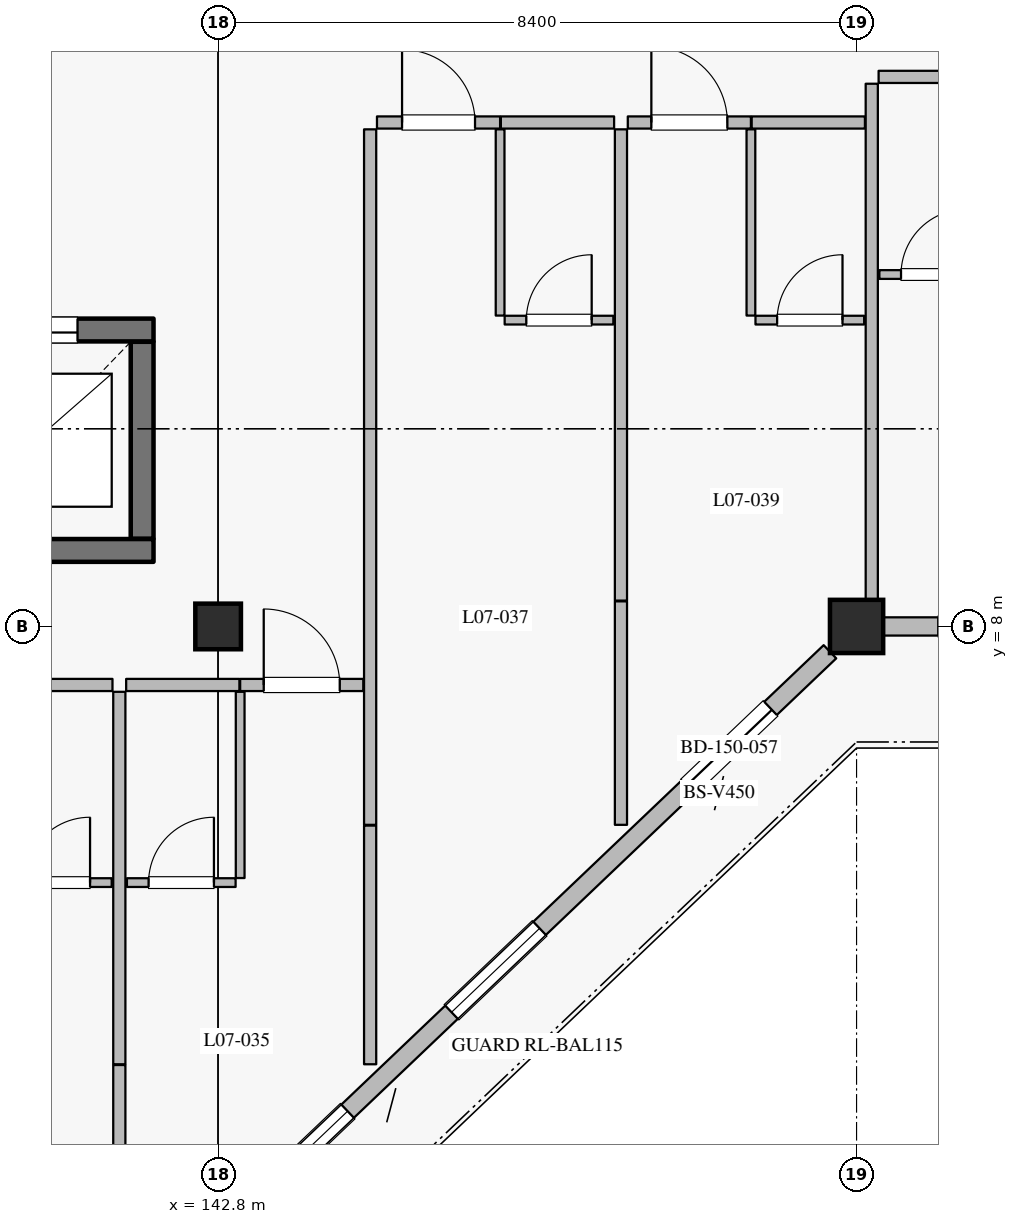
"""IFC4 building model, lengths in metres.
Left out: names, types, materials, properties, quantities, classifications, styles, units other than length and angle.
Written with IfcOpenShell. Run it as: python <this file> out.ifc"""

import sys

from ifc_helpers import new_model, si_unit, direction, frame, frame_2d, origin, origin_2d, place, context, subcontext, project, spatial, rectangle, extrude, element, fill, save


model = new_model("IFC4")
c1 = context("Model", 3, precision=1e-05, world=origin(), true_north=direction((0.0, 1.0)))
c2 = subcontext(c1, "Body", "Model", "MODEL_VIEW")
j1 = project(units=[si_unit("LENGTHUNIT", "METRE"), si_unit("PLANEANGLEUNIT", "RADIAN")], contexts=[c1])
p1 = place(None, origin())
s1 = spatial("IfcSite", under=j1, at=p1, CompositionType="ELEMENT")
p2 = place(p1, origin())
s2 = spatial("IfcBuilding", under=s1, at=p2, CompositionType="ELEMENT")
p3 = place(p2, frame((0.0, 0.0, 32.4)))
s3 = spatial("IfcBuildingStorey", under=s2, at=p3, CompositionType="ELEMENT", Elevation=32.4)
p4 = place(p3, frame((151.2, 8.0, 0.0), z_axis=(0.0, 0.0, 1.0), x_axis=(1.0, 0.0, 0.0)))
e1 = element("IfcColumn", 1, at=p4, inside=s3, PredefinedType="COLUMN", context=c2, shape_type="SweptSolid", body=[
    extrude(rectangle(XDim=0.7, YDim=0.7, at=origin_2d()), origin(), (0.0, 0.0, 1.0), 3.6),
])
p5 = place(p3, frame((142.8, 8.0, 0.0), z_axis=(0.0, 0.0, 1.0), x_axis=(1.0, 0.0, 0.0)))
e2 = element("IfcColumn", 2, at=p5, inside=s3, PredefinedType="COLUMN", context=c2, shape_type="SweptSolid", body=[
    extrude(rectangle(XDim=0.6, YDim=0.6, at=origin_2d()), origin(), (0.0, 0.0, 1.0), 3.6),
])
p6 = place(p3, frame((150.85, 7.667, 0.0), z_axis=(0.0, 0.0, 1.0), x_axis=(-0.724116091282, -0.689678103427, 0.0)))
e3 = element("IfcWall", 3, at=p6, inside=s3, PredefinedType="SOLIDWALL", context=c2, shape_type="SweptSolid", body=[
    extrude(rectangle(XDim=10.634, YDim=0.24, at=frame_2d((5.317, 0.0))), origin(), (0.0, 0.0, 1.0), 2.94),
])
p7 = place(p6, frame((1.08, 0.0, 0.0)))
e4 = element("IfcOpeningElement", 4, at=p7, cuts=e3, PredefinedType="OPENING", context=c2, shape_type="SweptSolid", body=[
    extrude(rectangle(XDim=1.5, YDim=2.25, at=frame_2d((0.75, 1.125))), frame((0.0, 0.13, 0.0), z_axis=(0.0, -1.0, 0.0), x_axis=(1.0, 0.0, 0.0)), (0.0, 0.0, 1.0), 0.26),
])
p8 = place(p6, frame((5.276, 0.0, 0.8)))
e5 = element("IfcOpeningElement", 5, at=p8, cuts=e3, PredefinedType="OPENING", context=c2, shape_type="SweptSolid", body=[
    extrude(rectangle(XDim=1.6, YDim=1.6, at=frame_2d((0.8, 0.8))), frame((0.0, 0.13, 0.0), z_axis=(0.0, -1.0, 0.0), x_axis=(1.0, 0.0, 0.0)), (0.0, 0.0, 1.0), 0.26),
])
p9 = place(p6, frame((8.764, 0.0, 0.8)))
e6 = element("IfcOpeningElement", 6, at=p9, cuts=e3, PredefinedType="OPENING", context=c2, shape_type="SweptSolid", body=[
    extrude(rectangle(XDim=1.6, YDim=1.6, at=frame_2d((0.8, 0.8))), frame((0.0, 0.13, 0.0), z_axis=(0.0, -1.0, 0.0), x_axis=(1.0, 0.0, 0.0)), (0.0, 0.0, 1.0), 0.26),
])
p10 = place(p3, frame((159.25, 8.0, 0.0), z_axis=(0.0, 0.0, 1.0), x_axis=(-1.0, 0.0, 0.0)))
e7 = element("IfcWall", 7, at=p10, inside=s3, PredefinedType="SOLIDWALL", context=c2, shape_type="SweptSolid", body=[
    extrude(rectangle(XDim=7.7, YDim=0.24, at=frame_2d((3.85, 0.0))), origin(), (0.0, 0.0, 1.0), 2.94),
])
p11 = place(p10, frame((2.15, 0.0, 0.0)))
e8 = element("IfcOpeningElement", 8, at=p11, cuts=e7, PredefinedType="OPENING", context=c2, shape_type="SweptSolid", body=[
    extrude(rectangle(XDim=1.5, YDim=2.25, at=frame_2d((0.75, 1.125))), frame((0.0, 0.13, 0.0), z_axis=(0.0, -1.0, 0.0), x_axis=(1.0, 0.0, 0.0)), (0.0, 0.0, 1.0), 0.26),
])
p12 = place(p10, frame((5.375, 0.0, 0.8)))
e9 = element("IfcOpeningElement", 9, at=p12, cuts=e7, PredefinedType="OPENING", context=c2, shape_type="SweptSolid", body=[
    extrude(rectangle(XDim=1.6, YDim=1.6, at=frame_2d((0.8, 0.8))), frame((0.0, 0.13, 0.0), z_axis=(0.0, -1.0, 0.0), x_axis=(1.0, 0.0, 0.0)), (0.0, 0.0, 1.0), 0.26),
])
p13 = place(p3, frame((138.85, 9.0, 0.0), z_axis=(0.0, 0.0, 1.0), x_axis=(1.0, 0.0, 0.0)))
e10 = element("IfcWall", 10, at=p13, inside=s3, PredefinedType="SHEAR", context=c2, shape_type="SweptSolid", body=[
    extrude(rectangle(XDim=3.1, YDim=0.3, at=frame_2d((1.55, 0.0))), origin(), (0.0, 0.0, 1.0), 3.335),
])
p14 = place(p3, frame((141.8, 9.155, 0.0), z_axis=(0.0, 0.0, 1.0), x_axis=(0.0, 1.0, 0.0)))
e11 = element("IfcWall", 11, at=p14, inside=s3, PredefinedType="SHEAR", context=c2, shape_type="SweptSolid", body=[
    extrude(rectangle(XDim=2.59, YDim=0.3, at=frame_2d((1.295, 0.0))), origin(), (0.0, 0.0, 1.0), 3.335),
])
p15 = place(p3, frame((141.95, 11.9, 0.0), z_axis=(0.0, 0.0, 1.0), x_axis=(-1.0, 0.0, 0.0)))
e12 = element("IfcWall", 12, at=p15, inside=s3, PredefinedType="SHEAR", context=c2, shape_type="SweptSolid", body=[
    extrude(rectangle(XDim=3.1, YDim=0.3, at=frame_2d((1.55, 0.0))), origin(), (0.0, 0.0, 1.0), 3.335),
])
p16 = place(p15, frame((1.0, 0.0, 0.0)))
e13 = element("IfcOpeningElement", 13, at=p16, cuts=e12, PredefinedType="OPENING", context=c2, shape_type="SweptSolid", body=[
    extrude(rectangle(XDim=1.1, YDim=2.2, at=frame_2d((0.55, 1.1))), frame((0.0, 0.16, 0.0), z_axis=(0.0, -1.0, 0.0), x_axis=(1.0, 0.0, 0.0)), (0.0, 0.0, 1.0), 0.32),
])
p17 = place(p3, frame((139.92, 7.23, 0.0), z_axis=(0.0, 0.0, 1.0), x_axis=(1.0, 0.0, 0.0)))
e14 = element("IfcWall", 14, at=p17, inside=s3, PredefinedType="PARTITIONING", context=c2, shape_type="SweptSolid", body=[
    extrude(rectangle(XDim=1.49, YDim=0.16, at=frame_2d((0.745, 0.0))), origin(), (0.0, 0.0, 1.0), 3.335),
])
p18 = place(p3, frame((139.97, 4.63, 0.0), z_axis=(0.0, 0.0, 1.0), x_axis=(1.0, 0.0, 0.0)))
e15 = element("IfcWall", 15, at=p18, inside=s3, PredefinedType="PARTITIONING", context=c2, shape_type="SweptSolid", body=[
    extrude(rectangle(XDim=1.43, YDim=0.115, at=frame_2d((0.715, 0.0))), origin(), (0.0, 0.0, 1.0), 3.335),
])
p19 = place(p18, frame((0.285, 0.0, 0.0)))
e16 = element("IfcOpeningElement", 16, at=p19, cuts=e15, PredefinedType="OPENING", context=c2, shape_type="SweptSolid", body=[
    extrude(rectangle(XDim=0.86, YDim=2.12, at=frame_2d((0.43, 1.06))), frame((0.0, 0.067, 0.0), z_axis=(0.0, -1.0, 0.0), x_axis=(1.0, 0.0, 0.0)), (0.0, 0.0, 1.0), 0.135),
])
p20 = place(p3, frame((141.5, 0.34, 0.0), z_axis=(0.0, 0.0, 1.0), x_axis=(0.0, 1.0, 0.0)))
e17 = element("IfcWall", 17, at=p20, inside=s3, PredefinedType="PARTITIONING", context=c2, shape_type="SweptSolid", body=[
    extrude(rectangle(XDim=1.89, YDim=0.16, at=frame_2d((0.945, 0.0))), origin(), (0.0, 0.0, 1.0), 3.335),
])
p21 = place(p3, frame((141.59, 7.23, 0.0), z_axis=(0.0, 0.0, 1.0), x_axis=(1.0, 0.0, 0.0)))
e18 = element("IfcWall", 18, at=p21, inside=s3, PredefinedType="PARTITIONING", context=c2, shape_type="SweptSolid", body=[
    extrude(rectangle(XDim=1.49, YDim=0.16, at=frame_2d((0.745, 0.0))), origin(), (0.0, 0.0, 1.0), 3.335),
])
p22 = place(p3, frame((143.09, 7.23, 0.0), z_axis=(0.0, 0.0, 1.0), x_axis=(1.0, 0.0, 0.0)))
e19 = element("IfcWall", 19, at=p22, inside=s3, PredefinedType="PARTITIONING", context=c2, shape_type="SweptSolid", body=[
    extrude(rectangle(XDim=1.62, YDim=0.16, at=frame_2d((0.81, 0.0))), origin(), (0.0, 0.0, 1.0), 3.335),
])
p23 = place(p22, frame((0.31, 0.0, 0.0)))
e20 = element("IfcOpeningElement", 20, at=p23, cuts=e19, PredefinedType="OPENING", context=c2, shape_type="SweptSolid", body=[
    extrude(rectangle(XDim=1.0, YDim=2.25, at=frame_2d((0.5, 1.125))), frame((0.0, 0.09, 0.0), z_axis=(0.0, -1.0, 0.0), x_axis=(1.0, 0.0, 0.0)), (0.0, 0.0, 1.0), 0.18),
])
p24 = place(p3, frame((143.09, 4.69, 0.0), z_axis=(0.0, 0.0, 1.0), x_axis=(0.0, 1.0, 0.0)))
e21 = element("IfcWall", 21, at=p24, inside=s3, PredefinedType="PARTITIONING", context=c2, shape_type="SweptSolid", body=[
    extrude(rectangle(XDim=2.45, YDim=0.115, at=frame_2d((1.225, 0.0))), origin(), (0.0, 0.0, 1.0), 3.335),
])
p25 = place(p3, frame((141.6, 4.63, 0.0), z_axis=(0.0, 0.0, 1.0), x_axis=(1.0, 0.0, 0.0)))
e22 = element("IfcWall", 22, at=p25, inside=s3, PredefinedType="PARTITIONING", context=c2, shape_type="SweptSolid", body=[
    extrude(rectangle(XDim=1.43, YDim=0.115, at=frame_2d((0.715, 0.0))), origin(), (0.0, 0.0, 1.0), 3.335),
])
p26 = place(p25, frame((0.285, 0.0, 0.0)))
e23 = element("IfcOpeningElement", 23, at=p26, cuts=e22, PredefinedType="OPENING", context=c2, shape_type="SweptSolid", body=[
    extrude(rectangle(XDim=0.86, YDim=2.12, at=frame_2d((0.43, 1.06))), frame((0.0, 0.067, 0.0), z_axis=(0.0, -1.0, 0.0), x_axis=(1.0, 0.0, 0.0)), (0.0, 0.0, 1.0), 0.135),
])
p27 = place(p3, frame((141.5, 2.24, 0.0), z_axis=(0.0, 0.0, 1.0), x_axis=(0.0, 1.0, 0.0)))
e24 = element("IfcWall", 24, at=p27, inside=s3, PredefinedType="PARTITIONING", context=c2, shape_type="SweptSolid", body=[
    extrude(rectangle(XDim=4.9, YDim=0.16, at=frame_2d((2.45, 0.0))), origin(), (0.0, 0.0, 1.0), 3.335),
])
p28 = place(p3, frame((144.8, 2.24, 0.0), z_axis=(0.0, 0.0, 1.0), x_axis=(0.0, 1.0, 0.0)))
e25 = element("IfcWall", 25, at=p28, inside=s3, PredefinedType="PARTITIONING", context=c2, shape_type="SweptSolid", body=[
    extrude(rectangle(XDim=3.14, YDim=0.16, at=frame_2d((1.57, 0.0))), origin(), (0.0, 0.0, 1.0), 3.335),
])
p29 = place(p3, frame((144.89, 14.63, 0.0), z_axis=(0.0, 0.0, 1.0), x_axis=(1.0, 0.0, 0.0)))
e26 = element("IfcWall", 26, at=p29, inside=s3, PredefinedType="PARTITIONING", context=c2, shape_type="SweptSolid", body=[
    extrude(rectangle(XDim=1.62, YDim=0.16, at=frame_2d((0.81, 0.0))), origin(), (0.0, 0.0, 1.0), 3.335),
])
p30 = place(p29, frame((0.33, 0.0, 0.0)))
e27 = element("IfcOpeningElement", 27, at=p30, cuts=e26, PredefinedType="OPENING", context=c2, shape_type="SweptSolid", body=[
    extrude(rectangle(XDim=0.96, YDim=2.2, at=frame_2d((0.48, 1.1))), frame((0.0, 0.09, 0.0), z_axis=(0.0, -1.0, 0.0), x_axis=(1.0, 0.0, 0.0)), (0.0, 0.0, 1.0), 0.18),
])
p31 = place(p3, frame((146.52, 14.63, 0.0), z_axis=(0.0, 0.0, 1.0), x_axis=(1.0, 0.0, 0.0)))
e28 = element("IfcWall", 28, at=p31, inside=s3, PredefinedType="PARTITIONING", context=c2, shape_type="SweptSolid", body=[
    extrude(rectangle(XDim=1.49, YDim=0.16, at=frame_2d((0.745, 0.0))), origin(), (0.0, 0.0, 1.0), 3.335),
])
p32 = place(p3, frame((146.51, 12.09, 0.0), z_axis=(0.0, 0.0, 1.0), x_axis=(0.0, 1.0, 0.0)))
e29 = element("IfcWall", 29, at=p32, inside=s3, PredefinedType="PARTITIONING", context=c2, shape_type="SweptSolid", body=[
    extrude(rectangle(XDim=2.45, YDim=0.115, at=frame_2d((1.225, 0.0))), origin(), (0.0, 0.0, 1.0), 3.335),
])
p33 = place(p3, frame((146.57, 12.03, 0.0), z_axis=(0.0, 0.0, 1.0), x_axis=(1.0, 0.0, 0.0)))
e30 = element("IfcWall", 30, at=p33, inside=s3, PredefinedType="PARTITIONING", context=c2, shape_type="SweptSolid", body=[
    extrude(rectangle(XDim=1.43, YDim=0.115, at=frame_2d((0.715, 0.0))), origin(), (0.0, 0.0, 1.0), 3.335),
])
p34 = place(p33, frame((0.285, 0.0, 0.0)))
e31 = element("IfcOpeningElement", 31, at=p34, cuts=e30, PredefinedType="OPENING", context=c2, shape_type="SweptSolid", body=[
    extrude(rectangle(XDim=0.86, YDim=2.12, at=frame_2d((0.43, 1.06))), frame((0.0, 0.067, 0.0), z_axis=(0.0, -1.0, 0.0), x_axis=(1.0, 0.0, 0.0)), (0.0, 0.0, 1.0), 0.135),
])
p35 = place(p3, frame((144.8, 5.39, 0.0), z_axis=(0.0, 0.0, 1.0), x_axis=(0.0, 1.0, 0.0)))
e32 = element("IfcWall", 32, at=p35, inside=s3, PredefinedType="PARTITIONING", context=c2, shape_type="SweptSolid", body=[
    extrude(rectangle(XDim=9.15, YDim=0.16, at=frame_2d((4.575, 0.0))), origin(), (0.0, 0.0, 1.0), 3.335),
])
p36 = place(p3, frame((148.1, 5.39, 0.0), z_axis=(0.0, 0.0, 1.0), x_axis=(0.0, 1.0, 0.0)))
e33 = element("IfcWall", 33, at=p36, inside=s3, PredefinedType="PARTITIONING", context=c2, shape_type="SweptSolid", body=[
    extrude(rectangle(XDim=2.94, YDim=0.16, at=frame_2d((1.47, 0.0))), origin(), (0.0, 0.0, 1.0), 3.335),
])
p37 = place(p3, frame((148.19, 14.63, 0.0), z_axis=(0.0, 0.0, 1.0), x_axis=(1.0, 0.0, 0.0)))
e34 = element("IfcWall", 34, at=p37, inside=s3, PredefinedType="PARTITIONING", context=c2, shape_type="SweptSolid", body=[
    extrude(rectangle(XDim=1.62, YDim=0.16, at=frame_2d((0.81, 0.0))), origin(), (0.0, 0.0, 1.0), 3.335),
])
p38 = place(p37, frame((0.31, 0.0, 0.0)))
e35 = element("IfcOpeningElement", 35, at=p38, cuts=e34, PredefinedType="OPENING", context=c2, shape_type="SweptSolid", body=[
    extrude(rectangle(XDim=1.0, YDim=2.25, at=frame_2d((0.5, 1.125))), frame((0.0, 0.09, 0.0), z_axis=(0.0, -1.0, 0.0), x_axis=(1.0, 0.0, 0.0)), (0.0, 0.0, 1.0), 0.18),
])
p39 = place(p3, frame((149.82, 14.63, 0.0), z_axis=(0.0, 0.0, 1.0), x_axis=(1.0, 0.0, 0.0)))
e36 = element("IfcWall", 36, at=p39, inside=s3, PredefinedType="PARTITIONING", context=c2, shape_type="SweptSolid", body=[
    extrude(rectangle(XDim=1.49, YDim=0.16, at=frame_2d((0.745, 0.0))), origin(), (0.0, 0.0, 1.0), 3.335),
])
p40 = place(p3, frame((149.81, 12.09, 0.0), z_axis=(0.0, 0.0, 1.0), x_axis=(0.0, 1.0, 0.0)))
e37 = element("IfcWall", 37, at=p40, inside=s3, PredefinedType="PARTITIONING", context=c2, shape_type="SweptSolid", body=[
    extrude(rectangle(XDim=2.45, YDim=0.115, at=frame_2d((1.225, 0.0))), origin(), (0.0, 0.0, 1.0), 3.335),
])
p41 = place(p3, frame((149.87, 12.03, 0.0), z_axis=(0.0, 0.0, 1.0), x_axis=(1.0, 0.0, 0.0)))
e38 = element("IfcWall", 38, at=p41, inside=s3, PredefinedType="PARTITIONING", context=c2, shape_type="SweptSolid", body=[
    extrude(rectangle(XDim=1.43, YDim=0.115, at=frame_2d((0.715, 0.0))), origin(), (0.0, 0.0, 1.0), 3.335),
])
p42 = place(p41, frame((0.285, 0.0, 0.0)))
e39 = element("IfcOpeningElement", 39, at=p42, cuts=e38, PredefinedType="OPENING", context=c2, shape_type="SweptSolid", body=[
    extrude(rectangle(XDim=0.86, YDim=2.12, at=frame_2d((0.43, 1.06))), frame((0.0, 0.067, 0.0), z_axis=(0.0, -1.0, 0.0), x_axis=(1.0, 0.0, 0.0)), (0.0, 0.0, 1.0), 0.135),
])
p43 = place(p3, frame((148.1, 8.34, 0.0), z_axis=(0.0, 0.0, 1.0), x_axis=(0.0, 1.0, 0.0)))
e40 = element("IfcWall", 40, at=p43, inside=s3, PredefinedType="PARTITIONING", context=c2, shape_type="SweptSolid", body=[
    extrude(rectangle(XDim=6.2, YDim=0.16, at=frame_2d((3.1, 0.0))), origin(), (0.0, 0.0, 1.0), 3.335),
])
p44 = place(p3, frame((151.49, 15.23, 0.0), z_axis=(0.0, 0.0, 1.0), x_axis=(1.0, 0.0, 0.0)))
e41 = element("IfcWall", 41, at=p44, inside=s3, PredefinedType="PARTITIONING", context=c2, shape_type="SweptSolid", body=[
    extrude(rectangle(XDim=1.49, YDim=0.16, at=frame_2d((0.745, 0.0))), origin(), (0.0, 0.0, 1.0), 3.335),
])
p45 = place(p3, frame((151.5, 12.63, 0.0), z_axis=(0.0, 0.0, 1.0), x_axis=(1.0, 0.0, 0.0)))
e42 = element("IfcWall", 42, at=p45, inside=s3, PredefinedType="PARTITIONING", context=c2, shape_type="SweptSolid", body=[
    extrude(rectangle(XDim=1.43, YDim=0.115, at=frame_2d((0.715, 0.0))), origin(), (0.0, 0.0, 1.0), 3.335),
])
p46 = place(p45, frame((0.285, 0.0, 0.0)))
e43 = element("IfcOpeningElement", 43, at=p46, cuts=e42, PredefinedType="OPENING", context=c2, shape_type="SweptSolid", body=[
    extrude(rectangle(XDim=0.86, YDim=2.12, at=frame_2d((0.43, 1.06))), frame((0.0, 0.067, 0.0), z_axis=(0.0, -1.0, 0.0), x_axis=(1.0, 0.0, 0.0)), (0.0, 0.0, 1.0), 0.135),
])
p47 = place(p3, frame((151.4, 8.34, 0.0), z_axis=(0.0, 0.0, 1.0), x_axis=(0.0, 1.0, 0.0)))
e44 = element("IfcWall", 44, at=p47, inside=s3, PredefinedType="PARTITIONING", context=c2, shape_type="SweptSolid", body=[
    extrude(rectangle(XDim=6.8, YDim=0.16, at=frame_2d((3.4, 0.0))), origin(), (0.0, 0.0, 1.0), 2.74),
])
p48 = place(p7, origin())
e45 = element("IfcDoor", 45, at=p48, inside=s3, OperationType="SLIDING_TO_LEFT", PredefinedType="DOOR", context=c2, shape_type="SweptSolid", body=[
    extrude(rectangle(XDim=1.5, YDim=2.25, at=frame_2d((0.75, 1.125))), frame((0.0, 0.025, 0.0), z_axis=(0.0, -1.0, 0.0), x_axis=(1.0, 0.0, 0.0)), (0.0, 0.0, 1.0), 0.05),
])
fill(e4, e45)
p49 = place(p8, origin())
e46 = element("IfcWindow", 46, at=p49, inside=s3, PartitioningType="SINGLE_PANEL", PredefinedType="WINDOW", context=c2, shape_type="SweptSolid", body=[
    extrude(rectangle(XDim=1.6, YDim=1.6, at=frame_2d((0.8, 0.8))), frame((0.0, 0.03, 0.0), z_axis=(0.0, -1.0, 0.0), x_axis=(1.0, 0.0, 0.0)), (0.0, 0.0, 1.0), 0.06),
])
fill(e5, e46)
p50 = place(p9, origin())
e47 = element("IfcWindow", 47, at=p50, inside=s3, PartitioningType="SINGLE_PANEL", PredefinedType="WINDOW", context=c2, shape_type="SweptSolid", body=[
    extrude(rectangle(XDim=1.6, YDim=1.6, at=frame_2d((0.8, 0.8))), frame((0.0, 0.03, 0.0), z_axis=(0.0, -1.0, 0.0), x_axis=(1.0, 0.0, 0.0)), (0.0, 0.0, 1.0), 0.06),
])
fill(e6, e47)
p51 = place(p12, origin())
e48 = element("IfcWindow", 48, at=p51, inside=s3, PartitioningType="SINGLE_PANEL", PredefinedType="WINDOW", context=c2, shape_type="SweptSolid", body=[
    extrude(rectangle(XDim=1.6, YDim=1.6, at=frame_2d((0.8, 0.8))), frame((0.0, 0.03, 0.0), z_axis=(0.0, -1.0, 0.0), x_axis=(1.0, 0.0, 0.0)), (0.0, 0.0, 1.0), 0.06),
])
fill(e9, e48)
p52 = place(p16, origin())
e49 = element("IfcDoor", 49, at=p52, inside=s3, OperationType="DOUBLE_DOOR_SLIDING", PredefinedType="DOOR", context=c2, shape_type="SweptSolid", body=[
    extrude(rectangle(XDim=1.1, YDim=2.2, at=frame_2d((0.55, 1.1))), frame((0.0, 0.025, 0.0), z_axis=(0.0, -1.0, 0.0), x_axis=(1.0, 0.0, 0.0)), (0.0, 0.0, 1.0), 0.05),
])
fill(e13, e49)
p53 = place(p19, origin())
e50 = element("IfcDoor", 50, at=p53, inside=s3, OperationType="SINGLE_SWING_RIGHT", PredefinedType="DOOR", context=c2, shape_type="SweptSolid", body=[
    extrude(rectangle(XDim=0.86, YDim=2.12, at=frame_2d((0.43, 1.06))), frame((0.0, 0.025, 0.0), z_axis=(0.0, -1.0, 0.0), x_axis=(1.0, 0.0, 0.0)), (0.0, 0.0, 1.0), 0.05),
])
fill(e16, e50)
p54 = place(p23, origin())
e51 = element("IfcDoor", 51, at=p54, inside=s3, OperationType="SINGLE_SWING_LEFT", PredefinedType="DOOR", context=c2, shape_type="SweptSolid", body=[
    extrude(rectangle(XDim=1.0, YDim=2.25, at=frame_2d((0.5, 1.125))), frame((0.0, 0.025, 0.0), z_axis=(0.0, -1.0, 0.0), x_axis=(1.0, 0.0, 0.0)), (0.0, 0.0, 1.0), 0.05),
])
fill(e20, e51)
p55 = place(p26, origin())
e52 = element("IfcDoor", 52, at=p55, inside=s3, OperationType="SINGLE_SWING_RIGHT", PredefinedType="DOOR", context=c2, shape_type="SweptSolid", body=[
    extrude(rectangle(XDim=0.86, YDim=2.12, at=frame_2d((0.43, 1.06))), frame((0.0, 0.025, 0.0), z_axis=(0.0, -1.0, 0.0), x_axis=(1.0, 0.0, 0.0)), (0.0, 0.0, 1.0), 0.05),
])
fill(e23, e52)
p56 = place(p30, origin())
e53 = element("IfcDoor", 53, at=p56, inside=s3, OperationType="SINGLE_SWING_LEFT", PredefinedType="DOOR", context=c2, shape_type="SweptSolid", body=[
    extrude(rectangle(XDim=0.96, YDim=2.2, at=frame_2d((0.48, 1.1))), frame((0.0, 0.025, 0.0), z_axis=(0.0, -1.0, 0.0), x_axis=(1.0, 0.0, 0.0)), (0.0, 0.0, 1.0), 0.05),
])
fill(e27, e53)
p57 = place(p34, origin())
e54 = element("IfcDoor", 54, at=p57, inside=s3, OperationType="SINGLE_SWING_RIGHT", PredefinedType="DOOR", context=c2, shape_type="SweptSolid", body=[
    extrude(rectangle(XDim=0.86, YDim=2.12, at=frame_2d((0.43, 1.06))), frame((0.0, 0.025, 0.0), z_axis=(0.0, -1.0, 0.0), x_axis=(1.0, 0.0, 0.0)), (0.0, 0.0, 1.0), 0.05),
])
fill(e31, e54)
p58 = place(p38, origin())
e55 = element("IfcDoor", 55, at=p58, inside=s3, OperationType="SINGLE_SWING_LEFT", PredefinedType="DOOR", context=c2, shape_type="SweptSolid", body=[
    extrude(rectangle(XDim=1.0, YDim=2.25, at=frame_2d((0.5, 1.125))), frame((0.0, 0.025, 0.0), z_axis=(0.0, -1.0, 0.0), x_axis=(1.0, 0.0, 0.0)), (0.0, 0.0, 1.0), 0.05),
])
fill(e35, e55)
p59 = place(p42, origin())
e56 = element("IfcDoor", 56, at=p59, inside=s3, OperationType="SINGLE_SWING_RIGHT", PredefinedType="DOOR", context=c2, shape_type="SweptSolid", body=[
    extrude(rectangle(XDim=0.86, YDim=2.12, at=frame_2d((0.43, 1.06))), frame((0.0, 0.025, 0.0), z_axis=(0.0, -1.0, 0.0), x_axis=(1.0, 0.0, 0.0)), (0.0, 0.0, 1.0), 0.05),
])
fill(e39, e56)
p60 = place(p46, origin())
e57 = element("IfcDoor", 57, at=p60, inside=s3, OperationType="SINGLE_SWING_RIGHT", PredefinedType="DOOR", context=c2, shape_type="SweptSolid", body=[
    extrude(rectangle(XDim=0.86, YDim=2.12, at=frame_2d((0.43, 1.06))), frame((0.0, 0.025, 0.0), z_axis=(0.0, -1.0, 0.0), x_axis=(1.0, 0.0, 0.0)), (0.0, 0.0, 1.0), 0.05),
])
fill(e43, e57)
save(model, sys.argv[1])
